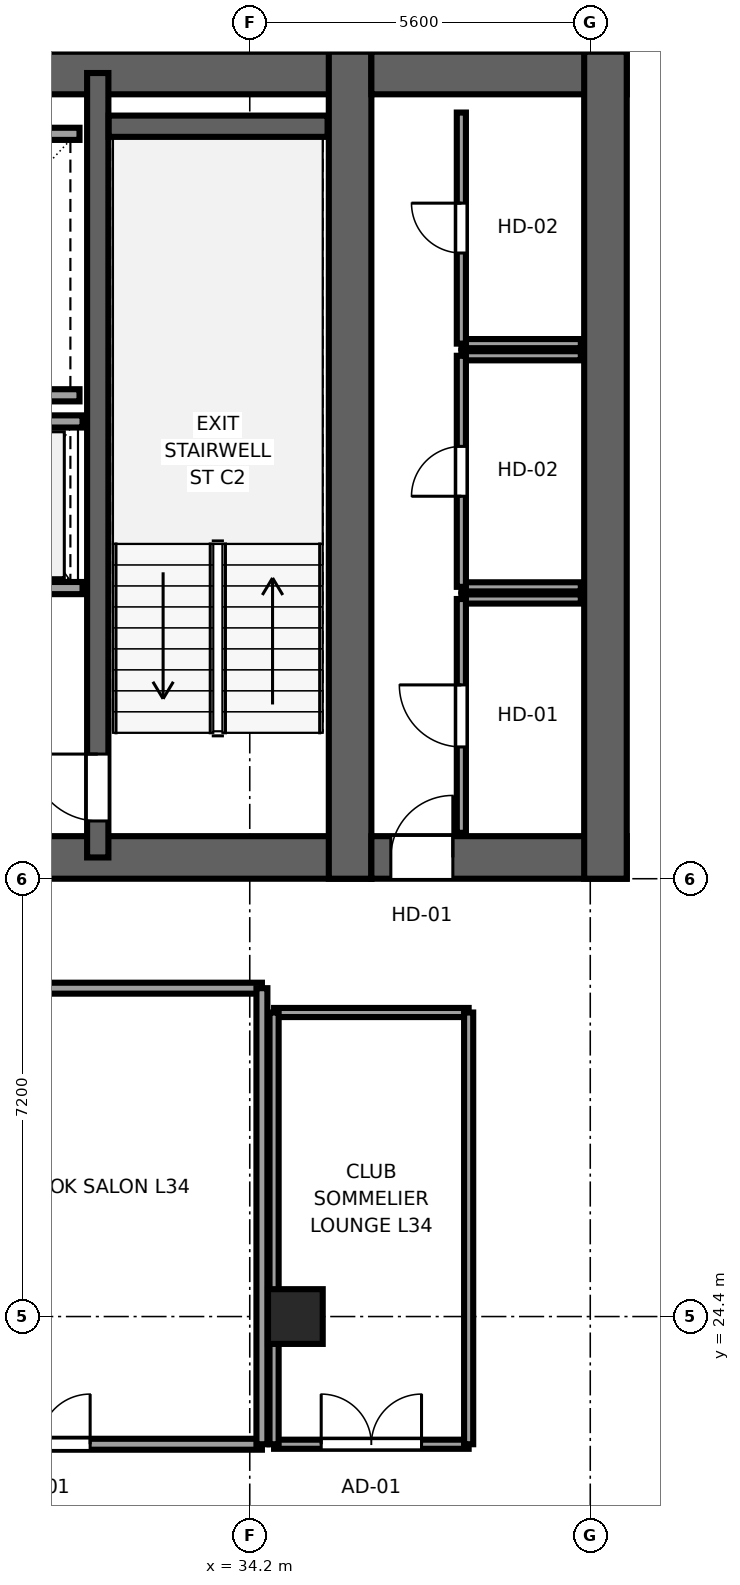
"""IFC4 building model, lengths in metres.
Left out: names, types, materials, properties, quantities, classifications, styles, units other than length and angle.
Written with IfcOpenShell. Run it as: python <this file> out.ifc"""

import sys

from ifc_helpers import new_model, si_unit, direction, frame, frame_2d, origin, origin_2d, place, context, subcontext, project, spatial, rectangle, extrude, source, transform, mapped, element, fill, save


model = new_model("IFC4")
c1 = context("Model", 3, precision=1e-05, world=origin(), true_north=direction((0.0, 1.0)))
c2 = subcontext(c1, "Body", "Model", "MODEL_VIEW")
j1 = project(units=[si_unit("LENGTHUNIT", "METRE"), si_unit("PLANEANGLEUNIT", "RADIAN")], contexts=[c1])
p1 = place(None, origin())
s1 = spatial("IfcSite", under=j1, at=p1, CompositionType="ELEMENT")
p2 = place(p1, origin())
s2 = spatial("IfcBuilding", under=s1, at=p2, CompositionType="ELEMENT")
p3 = place(p2, frame((0.0, 0.0, 132.85)))
s3 = spatial("IfcBuildingStorey", under=s2, at=p3, CompositionType="ELEMENT", Elevation=132.85)
p4 = place(p3, frame((9.8, 31.95, 0.0), z_axis=(0.0, 0.0, 1.0), x_axis=(1.0, 0.0, 0.0)))
e1 = element("IfcWall", 1, at=p4, inside=s3, PredefinedType="SHEAR", context=c2, shape_type="SweptSolid", body=[
    extrude(rectangle(XDim=26.4, YDim=0.7, at=frame_2d((13.2, 0.0))), origin(), (0.0, 0.0, 1.0), 3.55),
])
p5 = place(p4, frame((6.32, 0.0, 0.0), z_axis=(0.0, 0.0, 1.0), x_axis=(-1.0, 0.0, 0.0)))
e2 = element("IfcOpeningElement", 2, at=p5, cuts=e1, PredefinedType="OPENING", context=c2, shape_type="SweptSolid", body=[
    extrude(rectangle(XDim=1.5, YDim=2.04, at=frame_2d((0.75, 1.02))), frame((0.0, 0.36, 0.0), z_axis=(0.0, -1.0, 0.0), x_axis=(1.0, 0.0, 0.0)), (0.0, 0.0, 1.0), 0.72),
])
p6 = place(p4, frame((13.95, 0.0, 0.0), z_axis=(0.0, 0.0, 1.0), x_axis=(-1.0, 0.0, 0.0)))
e3 = element("IfcOpeningElement", 3, at=p6, cuts=e1, PredefinedType="OPENING", context=c2, shape_type="SweptSolid", body=[
    extrude(rectangle(XDim=1.5, YDim=2.04, at=frame_2d((0.75, 1.02))), frame((0.0, 0.36, 0.0), z_axis=(0.0, -1.0, 0.0), x_axis=(1.0, 0.0, 0.0)), (0.0, 0.0, 1.0), 0.72),
])
p7 = place(p4, frame((20.25, 0.0, 0.0), z_axis=(0.0, 0.0, 1.0), x_axis=(-1.0, 0.0, 0.0)))
e4 = element("IfcOpeningElement", 4, at=p7, cuts=e1, PredefinedType="OPENING", context=c2, shape_type="SweptSolid", body=[
    extrude(rectangle(XDim=1.5, YDim=2.04, at=frame_2d((0.75, 1.02))), frame((0.0, 0.36, 0.0), z_axis=(0.0, -1.0, 0.0), x_axis=(1.0, 0.0, 0.0)), (0.0, 0.0, 1.0), 0.72),
])
p8 = place(p4, frame((8.37, 0.0, 0.0), z_axis=(0.0, 0.0, 1.0), x_axis=(-1.0, 0.0, 0.0)))
e5 = element("IfcOpeningElement", 5, at=p8, cuts=e1, PredefinedType="OPENING", context=c2, shape_type="SweptSolid", body=[
    extrude(rectangle(XDim=0.82, YDim=2.01, at=frame_2d((0.41, 1.005))), frame((0.0, 0.36, 0.0), z_axis=(0.0, -1.0, 0.0), x_axis=(1.0, 0.0, 0.0)), (0.0, 0.0, 1.0), 0.72),
])
p9 = place(p3, frame((9.8, 44.85, 0.0), z_axis=(0.0, 0.0, 1.0), x_axis=(1.0, 0.0, 0.0)))
e6 = element("IfcWall", 6, at=p9, inside=s3, PredefinedType="SHEAR", context=c2, shape_type="SweptSolid", body=[
    extrude(rectangle(XDim=26.4, YDim=0.7, at=frame_2d((13.2, 0.0))), origin(), (0.0, 0.0, 1.0), 3.55),
])
p10 = place(p3, frame((35.85, 31.6, 0.0), z_axis=(0.0, 0.0, 1.0), x_axis=(0.0, 1.0, 0.0)))
e7 = element("IfcWall", 7, at=p10, inside=s3, PredefinedType="SHEAR", context=c2, shape_type="SweptSolid", body=[
    extrude(rectangle(XDim=13.6, YDim=0.7, at=frame_2d((6.8, 0.0))), origin(), (0.0, 0.0, 1.0), 3.55),
])
p11 = place(p3, frame((31.7, 31.95, 0.0), z_axis=(0.0, 0.0, 1.0), x_axis=(0.0, 1.0, 0.0)))
e8 = element("IfcWall", 8, at=p11, inside=s3, PredefinedType="SHEAR", context=c2, shape_type="SweptSolid", body=[
    extrude(rectangle(XDim=12.9, YDim=0.35, at=frame_2d((6.45, 0.0))), origin(), (0.0, 0.0, 1.0), 3.55),
])
p12 = place(p11, frame((1.7, 0.0, 0.0), z_axis=(0.0, 0.0, 1.0), x_axis=(-1.0, 0.0, 0.0)))
e9 = element("IfcOpeningElement", 9, at=p12, cuts=e8, PredefinedType="OPENING", context=c2, shape_type="SweptSolid", body=[
    extrude(rectangle(XDim=1.1, YDim=2.12, at=frame_2d((0.55, 1.06))), frame((0.0, 0.185, 0.0), z_axis=(0.0, -1.0, 0.0), x_axis=(1.0, 0.0, 0.0)), (0.0, 0.0, 1.0), 0.37),
])
p13 = place(p3, frame((36.2, 31.95, 0.0), z_axis=(0.0, 0.0, 1.0), x_axis=(1.0, 0.0, 0.0)))
e10 = element("IfcWall", 10, at=p13, inside=s3, PredefinedType="SHEAR", context=c2, shape_type="SweptSolid", body=[
    extrude(rectangle(XDim=4.2, YDim=0.7, at=frame_2d((2.1, 0.0))), origin(), (0.0, 0.0, 1.0), 3.55),
])
p14 = place(p13, frame((1.34, 0.0, 0.0), z_axis=(0.0, 0.0, 1.0), x_axis=(-1.0, 0.0, 0.0)))
e11 = element("IfcOpeningElement", 11, at=p14, cuts=e10, PredefinedType="OPENING", context=c2, shape_type="SweptSolid", body=[
    extrude(rectangle(XDim=1.02, YDim=2.03, at=frame_2d((0.51, 1.015))), frame((0.0, 0.36, 0.0), z_axis=(0.0, -1.0, 0.0), x_axis=(1.0, 0.0, 0.0)), (0.0, 0.0, 1.0), 0.72),
])
p15 = place(p3, frame((36.2, 44.85, 0.0), z_axis=(0.0, 0.0, 1.0), x_axis=(1.0, 0.0, 0.0)))
e12 = element("IfcWall", 12, at=p15, inside=s3, PredefinedType="SHEAR", context=c2, shape_type="SweptSolid", body=[
    extrude(rectangle(XDim=4.2, YDim=0.7, at=frame_2d((2.1, 0.0))), origin(), (0.0, 0.0, 1.0), 3.55),
])
p16 = place(p3, frame((40.05, 31.6, 0.0), z_axis=(0.0, 0.0, 1.0), x_axis=(0.0, 1.0, 0.0)))
e13 = element("IfcWall", 13, at=p16, inside=s3, PredefinedType="SHEAR", context=c2, shape_type="SweptSolid", body=[
    extrude(rectangle(XDim=13.6, YDim=0.7, at=frame_2d((6.8, 0.0))), origin(), (0.0, 0.0, 1.0), 3.55),
])
p17 = place(p3, frame((31.88, 43.975, 0.0), z_axis=(0.0, 0.0, 1.0), x_axis=(1.0, 0.0, 0.0)))
e14 = element("IfcWall", 14, at=p17, inside=s3, PredefinedType="SHEAR", context=c2, shape_type="SweptSolid", body=[
    extrude(rectangle(XDim=3.6, YDim=0.35, at=frame_2d((1.8, 0.0))), origin(), (0.0, 0.0, 1.0), 3.55),
])
m1 = source(origin(), c2, "Body", "SweptSolid", [
    extrude(rectangle(XDim=0.9, YDim=0.9, at=origin_2d()), origin(), (0.0, 0.0, 1.0), 3.55),
])
p18 = place(p3, frame((34.95, 24.4, 0.0), z_axis=(0.0, 0.0, 1.0), x_axis=(1.0, 0.0, 0.0)))
e15 = element("IfcColumn", 15, at=p18, inside=s3, PredefinedType="COLUMN", context=c2, shape_type="MappedRepresentation", body=[
    mapped(m1, transform((0.0, 0.0, 0.0), x_axis=(1.0, 0.0, 0.0), y_axis=(0.0, 1.0, 0.0), z_axis=(0.0, 0.0, 1.0), scale=1.0)),
])
for number, where, z_axis, x_axis in (
    (16, (27.3, 39.55, 0.0), (0.0, 0.0, 1.0), (1.0, 0.0, 0.0)),
    (17, (27.3, 43.85, 0.0), (0.0, 0.0, 1.0), (1.0, 0.0, 0.0)),
):
    element("IfcWall", number, at=place(p3, frame(where, z_axis=z_axis, x_axis=x_axis)), inside=s3, PredefinedType="SOLIDWALL", context=c2, shape_type="SweptSolid", body=[
        extrude(rectangle(XDim=4.1, YDim=0.2, at=frame_2d((2.05, 0.0))), origin(), (0.0, 0.0, 1.0), 3.37),
    ])
p19 = place(p3, frame((27.375, 36.38, 0.0), z_axis=(0.0, 0.0, 1.0), x_axis=(1.0, 0.0, 0.0)))
e18 = element("IfcWall", 18, at=p19, inside=s3, PredefinedType="SOLIDWALL", context=c2, shape_type="SweptSolid", body=[
    extrude(rectangle(XDim=4.075, YDim=0.2, at=frame_2d((2.038, 0.0))), origin(), (0.0, 0.0, 1.0), 3.37),
])
p20 = place(p19, frame((0.525, 0.0, 0.0)))
e19 = element("IfcOpeningElement", 19, at=p20, cuts=e18, PredefinedType="OPENING", context=c2, shape_type="SweptSolid", body=[
    extrude(rectangle(XDim=1.1, YDim=2.12, at=frame_2d((0.55, 1.06))), frame((0.0, 0.11, 0.0), z_axis=(0.0, -1.0, 0.0), x_axis=(1.0, 0.0, 0.0)), (0.0, 0.0, 1.0), 0.22),
])
p21 = place(p19, frame((2.425, 0.0, 0.0)))
e20 = element("IfcOpeningElement", 20, at=p21, cuts=e18, PredefinedType="OPENING", context=c2, shape_type="SweptSolid", body=[
    extrude(rectangle(XDim=1.1, YDim=2.12, at=frame_2d((0.55, 1.06))), frame((0.0, 0.11, 0.0), z_axis=(0.0, -1.0, 0.0), x_axis=(1.0, 0.0, 0.0)), (0.0, 0.0, 1.0), 0.22),
])
p22 = place(p3, frame((27.375, 39.12, 0.0), z_axis=(0.0, 0.0, 1.0), x_axis=(1.0, 0.0, 0.0)))
e21 = element("IfcWall", 21, at=p22, inside=s3, PredefinedType="SOLIDWALL", context=c2, shape_type="SweptSolid", body=[
    extrude(rectangle(XDim=4.075, YDim=0.2, at=frame_2d((2.038, 0.0))), origin(), (0.0, 0.0, 1.0), 3.37),
])
p23 = place(p3, frame((37.68, 36.2, 0.0), z_axis=(0.0, 0.0, 1.0), x_axis=(1.0, 0.0, 0.0)))
e22 = element("IfcWall", 22, at=p23, inside=s3, PredefinedType="PARTITIONING", context=c2, shape_type="SweptSolid", body=[
    extrude(rectangle(XDim=1.965, YDim=0.15, at=frame_2d((0.982, 0.0))), origin(), (0.0, 0.0, 1.0), 3.37),
])
p24 = place(p3, frame((37.68, 32.355, 0.0), z_axis=(0.0, 0.0, 1.0), x_axis=(0.0, 1.0, 0.0)))
e23 = element("IfcWall", 23, at=p24, inside=s3, PredefinedType="PARTITIONING", context=c2, shape_type="SweptSolid", body=[
    extrude(rectangle(XDim=3.845, YDim=0.15, at=frame_2d((1.922, 0.0))), origin(), (0.0, 0.0, 1.0), 3.37),
])
p25 = place(p24, frame((1.413, 0.0, 0.0)))
e24 = element("IfcOpeningElement", 24, at=p25, cuts=e23, PredefinedType="OPENING", context=c2, shape_type="SweptSolid", body=[
    extrude(rectangle(XDim=1.02, YDim=2.03, at=frame_2d((0.51, 1.015))), frame((0.0, 0.085, 0.0), z_axis=(0.0, -1.0, 0.0), x_axis=(1.0, 0.0, 0.0)), (0.0, 0.0, 1.0), 0.17),
])
for number, where, z_axis, x_axis in (
    (25, (37.68, 36.4, 0.0), (0.0, 0.0, 1.0), (1.0, 0.0, 0.0)),
    (26, (37.68, 40.2, 0.0), (0.0, 0.0, 1.0), (1.0, 0.0, 0.0)),
):
    element("IfcWall", number, at=place(p3, frame(where, z_axis=z_axis, x_axis=x_axis)), inside=s3, PredefinedType="PARTITIONING", context=c2, shape_type="SweptSolid", body=[
        extrude(rectangle(XDim=1.965, YDim=0.15, at=frame_2d((0.982, 0.0))), origin(), (0.0, 0.0, 1.0), 3.37),
    ])
p26 = place(p3, frame((37.68, 36.4, 0.0), z_axis=(0.0, 0.0, 1.0), x_axis=(0.0, 1.0, 0.0)))
e27 = element("IfcWall", 27, at=p26, inside=s3, PredefinedType="PARTITIONING", context=c2, shape_type="SweptSolid", body=[
    extrude(rectangle(XDim=3.8, YDim=0.15, at=frame_2d((1.9, 0.0))), origin(), (0.0, 0.0, 1.0), 3.37),
])
p27 = place(p26, frame((1.49, 0.0, 0.0)))
e28 = element("IfcOpeningElement", 28, at=p27, cuts=e27, PredefinedType="OPENING", context=c2, shape_type="SweptSolid", body=[
    extrude(rectangle(XDim=0.82, YDim=2.01, at=frame_2d((0.41, 1.005))), frame((0.0, 0.085, 0.0), z_axis=(0.0, -1.0, 0.0), x_axis=(1.0, 0.0, 0.0)), (0.0, 0.0, 1.0), 0.17),
])
p28 = place(p3, frame((37.68, 40.4, 0.0), z_axis=(0.0, 0.0, 1.0), x_axis=(1.0, 0.0, 0.0)))
e29 = element("IfcWall", 29, at=p28, inside=s3, PredefinedType="PARTITIONING", context=c2, shape_type="SweptSolid", body=[
    extrude(rectangle(XDim=1.965, YDim=0.15, at=frame_2d((0.982, 0.0))), origin(), (0.0, 0.0, 1.0), 3.37),
])
p29 = place(p3, frame((37.68, 40.4, 0.0), z_axis=(0.0, 0.0, 1.0), x_axis=(0.0, 1.0, 0.0)))
e30 = element("IfcWall", 30, at=p29, inside=s3, PredefinedType="PARTITIONING", context=c2, shape_type="SweptSolid", body=[
    extrude(rectangle(XDim=3.8, YDim=0.15, at=frame_2d((1.9, 0.0))), origin(), (0.0, 0.0, 1.0), 3.37),
])
p30 = place(p29, frame((1.49, 0.0, 0.0)))
e31 = element("IfcOpeningElement", 31, at=p30, cuts=e30, PredefinedType="OPENING", context=c2, shape_type="SweptSolid", body=[
    extrude(rectangle(XDim=0.82, YDim=2.01, at=frame_2d((0.41, 1.005))), frame((0.0, 0.085, 0.0), z_axis=(0.0, -1.0, 0.0), x_axis=(1.0, 0.0, 0.0)), (0.0, 0.0, 1.0), 0.17),
])
p31 = place(p3, frame((27.1, 22.3, 0.0), z_axis=(0.0, 0.0, 1.0), x_axis=(1.0, 0.0, 0.0)))
e32 = element("IfcWall", 32, at=p31, inside=s3, PredefinedType="PARTITIONING", context=c2, shape_type="SweptSolid", body=[
    extrude(rectangle(XDim=7.3, YDim=0.18, at=frame_2d((3.65, 0.0))), origin(), (0.0, 0.0, 1.0), 3.37),
])
p32 = place(p31, frame((2.825, 0.0, 0.0)))
e33 = element("IfcOpeningElement", 33, at=p32, cuts=e32, PredefinedType="OPENING", context=c2, shape_type="SweptSolid", body=[
    extrude(rectangle(XDim=1.65, YDim=2.15, at=frame_2d((0.825, 1.075))), frame((0.0, 0.1, 0.0), z_axis=(0.0, -1.0, 0.0), x_axis=(1.0, 0.0, 0.0)), (0.0, 0.0, 1.0), 0.2),
])
p33 = place(p3, frame((27.1, 29.8, 0.0), z_axis=(0.0, 0.0, 1.0), x_axis=(1.0, 0.0, 0.0)))
e34 = element("IfcWall", 34, at=p33, inside=s3, PredefinedType="PARTITIONING", context=c2, shape_type="SweptSolid", body=[
    extrude(rectangle(XDim=7.3, YDim=0.18, at=frame_2d((3.65, 0.0))), origin(), (0.0, 0.0, 1.0), 3.37),
])
p34 = place(p3, frame((34.4, 22.3, 0.0), z_axis=(0.0, 0.0, 1.0), x_axis=(0.0, 1.0, 0.0)))
e35 = element("IfcWall", 35, at=p34, inside=s3, PredefinedType="PARTITIONING", context=c2, shape_type="SweptSolid", body=[
    extrude(rectangle(XDim=7.5, YDim=0.18, at=frame_2d((3.75, 0.0))), origin(), (0.0, 0.0, 1.0), 3.37),
])
p35 = place(p3, frame((34.6, 22.3, 0.0), z_axis=(0.0, 0.0, 1.0), x_axis=(1.0, 0.0, 0.0)))
e36 = element("IfcWall", 36, at=p35, inside=s3, PredefinedType="PARTITIONING", context=c2, shape_type="SweptSolid", body=[
    extrude(rectangle(XDim=3.2, YDim=0.15, at=frame_2d((1.6, 0.0))), origin(), (0.0, 0.0, 1.0), 3.37),
])
p36 = place(p35, frame((0.775, 0.0, 0.0)))
e37 = element("IfcOpeningElement", 37, at=p36, cuts=e36, PredefinedType="OPENING", context=c2, shape_type="SweptSolid", body=[
    extrude(rectangle(XDim=1.65, YDim=2.15, at=frame_2d((0.825, 1.075))), frame((0.0, 0.085, 0.0), z_axis=(0.0, -1.0, 0.0), x_axis=(1.0, 0.0, 0.0)), (0.0, 0.0, 1.0), 0.17),
])
p37 = place(p3, frame((34.6, 29.4, 0.0), z_axis=(0.0, 0.0, 1.0), x_axis=(1.0, 0.0, 0.0)))
e38 = element("IfcWall", 38, at=p37, inside=s3, PredefinedType="PARTITIONING", context=c2, shape_type="SweptSolid", body=[
    extrude(rectangle(XDim=3.2, YDim=0.15, at=frame_2d((1.6, 0.0))), origin(), (0.0, 0.0, 1.0), 3.37),
])
for number, where, z_axis, x_axis in (
    (39, (34.6, 22.3, 0.0), (0.0, 0.0, 1.0), (0.0, 1.0, 0.0)),
    (40, (37.8, 22.3, 0.0), (0.0, 0.0, 1.0), (0.0, 1.0, 0.0)),
):
    element("IfcWall", number, at=place(p3, frame(where, z_axis=z_axis, x_axis=x_axis)), inside=s3, PredefinedType="PARTITIONING", context=c2, shape_type="SweptSolid", body=[
        extrude(rectangle(XDim=7.1, YDim=0.15, at=frame_2d((3.55, 0.0))), origin(), (0.0, 0.0, 1.0), 3.37),
    ])
m2 = source(origin(), c2, "Body", "SweptSolid", [
    extrude(rectangle(XDim=1.1, YDim=2.12, at=frame_2d((0.55, 1.06))), frame((0.0, 0.025, 0.0), z_axis=(0.0, -1.0, 0.0), x_axis=(1.0, 0.0, 0.0)), (0.0, 0.0, 1.0), 0.05),
])
p38 = place(p12, origin())
e41 = element("IfcDoor", 41, at=p38, inside=s3, OperationType="SINGLE_SWING_RIGHT", PredefinedType="DOOR", context=c2, shape_type="MappedRepresentation", body=[
    mapped(m2, transform((0.0, 0.0, 0.0), x_axis=(1.0, 0.0, 0.0), y_axis=(0.0, 1.0, 0.0), z_axis=(0.0, 0.0, 1.0), scale=1.0)),
])
fill(e9, e41)
m3 = source(origin(), c2, "Body", "SweptSolid", [
    extrude(rectangle(XDim=1.02, YDim=2.03, at=frame_2d((0.51, 1.015))), frame((0.0, 0.025, 0.0), z_axis=(0.0, -1.0, 0.0), x_axis=(1.0, 0.0, 0.0)), (0.0, 0.0, 1.0), 0.05),
])
p39 = place(p14, origin())
e42 = element("IfcDoor", 42, at=p39, inside=s3, OperationType="SINGLE_SWING_RIGHT", PredefinedType="DOOR", context=c2, shape_type="MappedRepresentation", body=[
    mapped(m3, transform((0.0, 0.0, 0.0), x_axis=(1.0, 0.0, 0.0), y_axis=(0.0, 1.0, 0.0), z_axis=(0.0, 0.0, 1.0), scale=1.0)),
])
fill(e11, e42)
p40 = place(p25, origin())
e43 = element("IfcDoor", 43, at=p40, inside=s3, OperationType="SINGLE_SWING_RIGHT", PredefinedType="DOOR", context=c2, shape_type="MappedRepresentation", body=[
    mapped(m3, transform((0.0, 0.0, 0.0), x_axis=(1.0, 0.0, 0.0), y_axis=(0.0, 1.0, 0.0), z_axis=(0.0, 0.0, 1.0), scale=1.0)),
])
fill(e24, e43)
m4 = source(origin(), c2, "Body", "SweptSolid", [
    extrude(rectangle(XDim=0.82, YDim=2.01, at=frame_2d((0.41, 1.005))), frame((0.0, 0.025, 0.0), z_axis=(0.0, -1.0, 0.0), x_axis=(1.0, 0.0, 0.0)), (0.0, 0.0, 1.0), 0.05),
])
p41 = place(p27, origin())
e44 = element("IfcDoor", 44, at=p41, inside=s3, OperationType="SINGLE_SWING_LEFT", PredefinedType="DOOR", context=c2, shape_type="MappedRepresentation", body=[
    mapped(m4, transform((0.0, 0.0, 0.0), x_axis=(1.0, 0.0, 0.0), y_axis=(0.0, 1.0, 0.0), z_axis=(0.0, 0.0, 1.0), scale=1.0)),
])
fill(e28, e44)
p42 = place(p30, origin())
e45 = element("IfcDoor", 45, at=p42, inside=s3, OperationType="SINGLE_SWING_RIGHT", PredefinedType="DOOR", context=c2, shape_type="MappedRepresentation", body=[
    mapped(m4, transform((0.0, 0.0, 0.0), x_axis=(1.0, 0.0, 0.0), y_axis=(0.0, 1.0, 0.0), z_axis=(0.0, 0.0, 1.0), scale=1.0)),
])
fill(e31, e45)
m5 = source(origin(), c2, "Body", "SweptSolid", [
    extrude(rectangle(XDim=1.65, YDim=2.15, at=frame_2d((0.825, 1.075))), frame((0.0, 0.025, 0.0), z_axis=(0.0, -1.0, 0.0), x_axis=(1.0, 0.0, 0.0)), (0.0, 0.0, 1.0), 0.05),
])
p43 = place(p32, origin())
e46 = element("IfcDoor", 46, at=p43, inside=s3, OperationType="DOUBLE_DOOR_SINGLE_SWING", PredefinedType="DOOR", context=c2, shape_type="MappedRepresentation", body=[
    mapped(m5, transform((0.0, 0.0, 0.0), x_axis=(1.0, 0.0, 0.0), y_axis=(0.0, 1.0, 0.0), z_axis=(0.0, 0.0, 1.0), scale=1.0)),
])
fill(e33, e46)
p44 = place(p36, origin())
e47 = element("IfcDoor", 47, at=p44, inside=s3, OperationType="DOUBLE_DOOR_SINGLE_SWING", PredefinedType="DOOR", context=c2, shape_type="MappedRepresentation", body=[
    mapped(m5, transform((0.0, 0.0, 0.0), x_axis=(1.0, 0.0, 0.0), y_axis=(0.0, 1.0, 0.0), z_axis=(0.0, 0.0, 1.0), scale=1.0)),
])
fill(e37, e47)
save(model, sys.argv[1])
